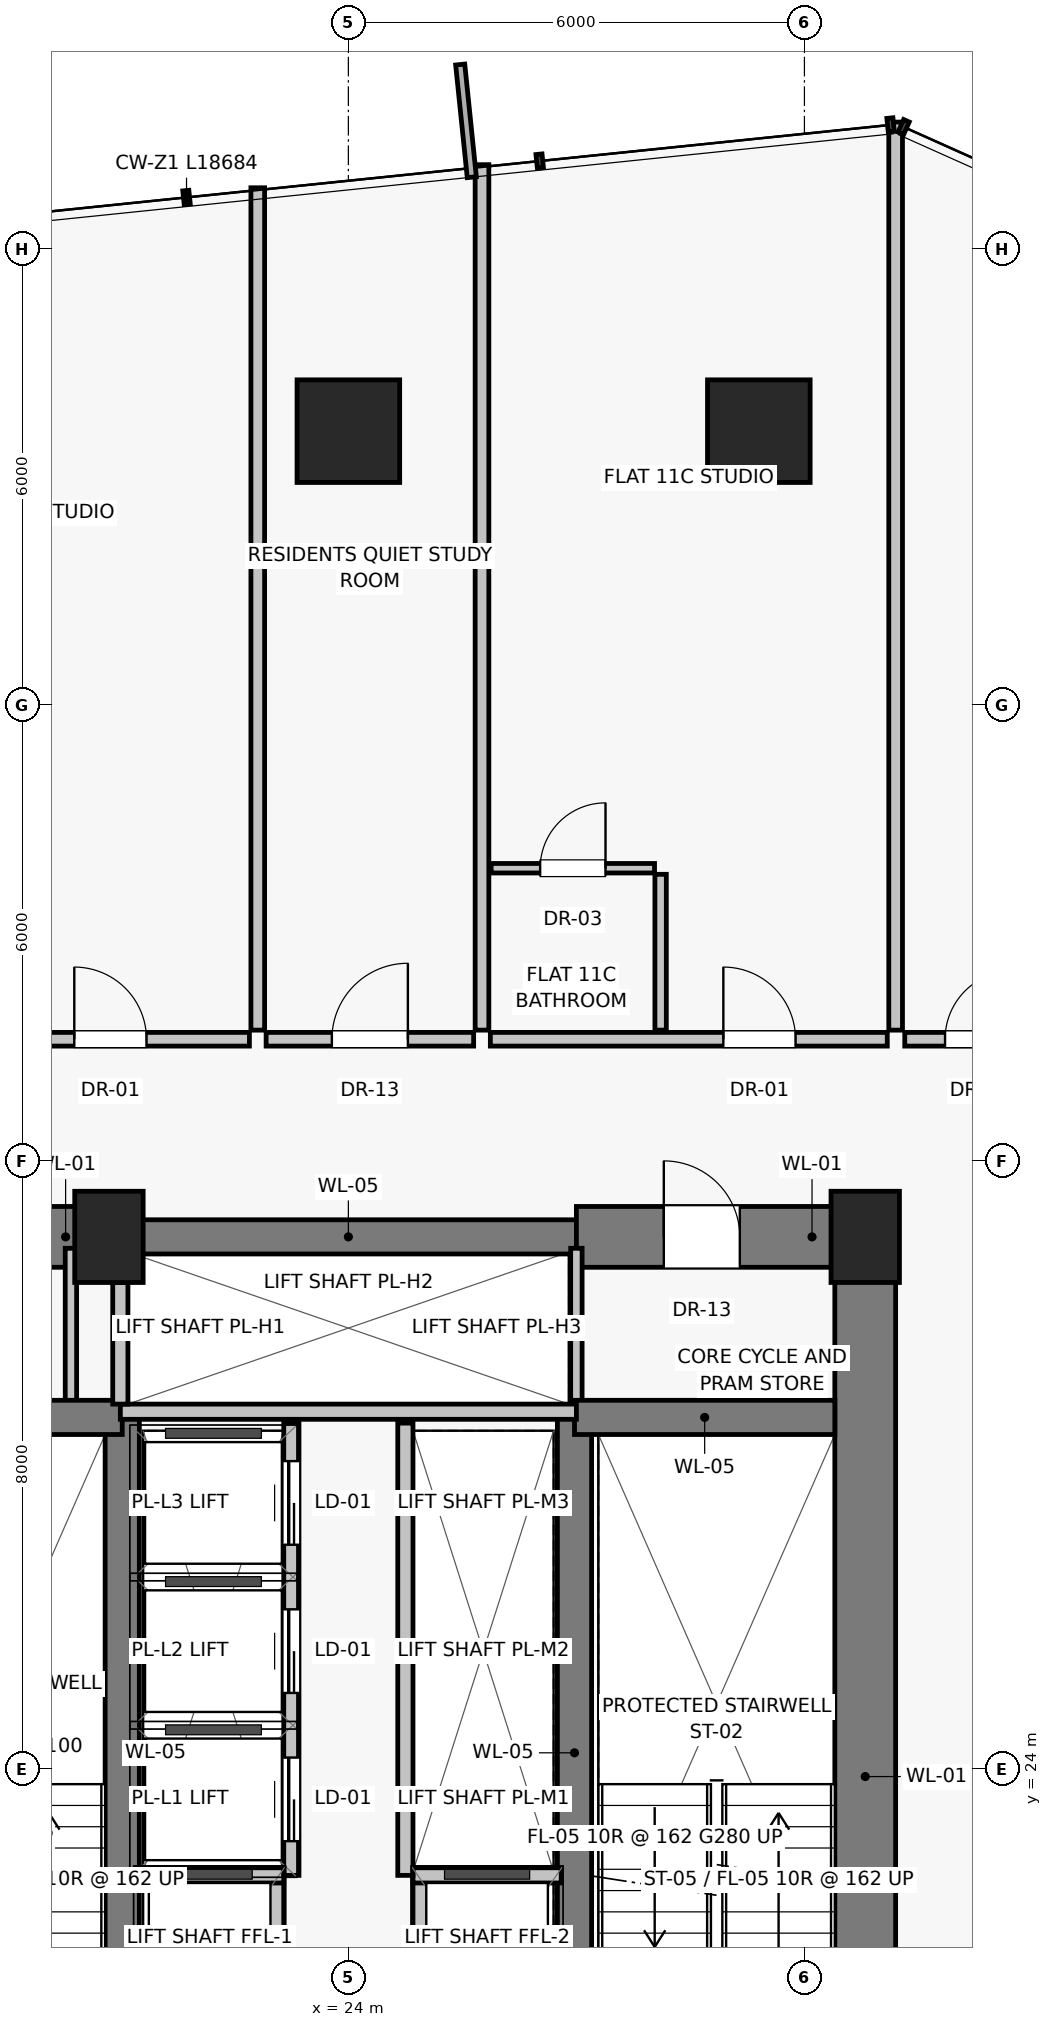
"""IFC4 building model, lengths in metres.
Left out: names, types, materials, properties, quantities, classifications, styles, units other than length and angle.
Written with IfcOpenShell. Run it as: python <this file> out.ifc"""

import sys

from ifc_helpers import new_model, si_unit, direction, frame, frame_2d, origin, origin_2d, place, context, subcontext, project, spatial, rectangle, extrude, source, transform, mapped, element, fill, save


model = new_model("IFC4")
c1 = context("Model", 3, precision=1e-05, world=origin(), true_north=direction((0.0, 1.0)))
c2 = subcontext(c1, "Body", "Model", "MODEL_VIEW")
j1 = project(units=[si_unit("LENGTHUNIT", "METRE"), si_unit("PLANEANGLEUNIT", "RADIAN")], contexts=[c1])
p1 = place(None, origin())
s1 = spatial("IfcSite", under=j1, at=p1, CompositionType="ELEMENT")
p2 = place(p1, origin())
s2 = spatial("IfcBuilding", under=s1, at=p2, CompositionType="ELEMENT")
p3 = place(p2, frame((0.0, 0.0, 43.55)))
s3 = spatial("IfcBuildingStorey", under=s2, at=p3, CompositionType="ELEMENT", Elevation=43.55)
for number, where, z_axis, x_axis in (
    (1, (20.85, 31.0, 0.0), (0.0, 0.0, 1.0), (1.0, 0.0, 0.0)),
    (2, (30.8, 31.0, 0.0), (0.0, 0.0, 1.0), (1.0, 0.0, 0.0)),
):
    element("IfcColumn", number, at=place(p3, frame(where, z_axis=z_axis, x_axis=x_axis)), inside=s3, PredefinedType="PILASTER", context=c2, shape_type="SweptSolid", body=[
        extrude(rectangle(XDim=0.9, YDim=1.2, at=origin_2d()), origin(), (0.0, 0.0, 1.0), 3.25),
    ])
for number, where, z_axis, x_axis in (
    (3, (29.4, 41.6, 0.0), (0.0, 0.0, 1.0), (1.0, 0.0, 0.0)),
    (4, (24.0, 41.6, 0.0), (0.0, 0.0, 1.0), (1.0, 0.0, 0.0)),
):
    element("IfcColumn", number, at=place(p3, frame(where, z_axis=z_axis, x_axis=x_axis)), inside=s3, PredefinedType="COLUMN", context=c2, shape_type="SweptSolid", body=[
        extrude(rectangle(XDim=1.35, YDim=1.35, at=origin_2d()), origin(), (0.0, 0.0, 1.0), 3.25),
    ])
p4 = place(p3, frame((30.8, 16.8, 0.0), z_axis=(0.0, 0.0, 1.0), x_axis=(0.0, 1.0, 0.0)))
e5 = element("IfcWall", 5, at=p4, inside=s3, PredefinedType="SHEAR", context=c2, shape_type="SweptSolid", body=[
    extrude(rectangle(XDim=14.2, YDim=0.8, at=frame_2d((7.1, 0.0))), origin(), (0.0, 0.0, 1.0), 3.0),
])
p5 = place(p3, frame((17.2, 31.0, 0.0), z_axis=(0.0, 0.0, 1.0), x_axis=(1.0, 0.0, 0.0)))
e6 = element("IfcWall", 6, at=p5, inside=s3, PredefinedType="SHEAR", context=c2, shape_type="SweptSolid", body=[
    extrude(rectangle(XDim=3.8, YDim=0.8, at=frame_2d((1.9, 0.0))), origin(), (0.0, 0.0, 1.0), 3.0),
])
p6 = place(p5, frame((1.25, 0.0, 0.0)))
e7 = element("IfcOpeningElement", 7, at=p6, cuts=e6, PredefinedType="OPENING", context=c2, shape_type="SweptSolid", body=[
    extrude(rectangle(XDim=0.86, YDim=2.01, at=frame_2d((0.43, 1.005))), frame((0.0, 0.41, 0.0), z_axis=(0.0, -1.0, 0.0), x_axis=(1.0, 0.0, 0.0)), (0.0, 0.0, 1.0), 0.82),
])
p7 = place(p3, frame((21.0, 31.0, 0.0), z_axis=(0.0, 0.0, 1.0), x_axis=(1.0, 0.0, 0.0)))
e8 = element("IfcWall", 8, at=p7, inside=s3, PredefinedType="SHEAR", context=c2, shape_type="SweptSolid", body=[
    extrude(rectangle(XDim=6.0, YDim=0.45, at=frame_2d((3.0, 0.0))), origin(), (0.0, 0.0, 1.0), 3.0),
])
p8 = place(p3, frame((27.0, 31.0, 0.0), z_axis=(0.0, 0.0, 1.0), x_axis=(1.0, 0.0, 0.0)))
e9 = element("IfcWall", 9, at=p8, inside=s3, PredefinedType="SHEAR", context=c2, shape_type="SweptSolid", body=[
    extrude(rectangle(XDim=3.8, YDim=0.8, at=frame_2d((1.9, 0.0))), origin(), (0.0, 0.0, 1.0), 3.0),
])
p9 = place(p8, frame((1.15, 0.0, 0.0)))
e10 = element("IfcOpeningElement", 10, at=p9, cuts=e9, PredefinedType="OPENING", context=c2, shape_type="SweptSolid", body=[
    extrude(rectangle(XDim=1.0, YDim=2.01, at=frame_2d((0.5, 1.005))), frame((0.0, 0.41, 0.0), z_axis=(0.0, -1.0, 0.0), x_axis=(1.0, 0.0, 0.0)), (0.0, 0.0, 1.0), 0.82),
])
for number, where, z_axis, x_axis in (
    (11, (20.35, 28.65, 0.0), (0.0, 0.0, 1.0), (0.0, 1.0, 0.0)),
    (12, (27.0, 28.65, 0.0), (0.0, 0.0, 1.0), (0.0, 1.0, 0.0)),
):
    element("IfcWall", number, at=place(p3, frame(where, z_axis=z_axis, x_axis=x_axis)), inside=s3, PredefinedType="PARTITIONING", context=c2, shape_type="SweptSolid", body=[
        extrude(rectangle(XDim=2.2, YDim=0.15, at=frame_2d((1.1, 0.0))), origin(), (0.0, 0.0, 1.0), 3.0),
    ])
for number, where, z_axis, x_axis in (
    (13, (21.025, 19.8, 0.0), (0.0, 0.0, 1.0), (0.0, 1.0, 0.0)),
    (14, (26.975, 19.8, 0.0), (0.0, 0.0, 1.0), (0.0, 1.0, 0.0)),
):
    element("IfcWall", number, at=place(p3, frame(where, z_axis=z_axis, x_axis=x_axis)), inside=s3, PredefinedType="SHEAR", context=c2, shape_type="SweptSolid", body=[
        extrude(rectangle(XDim=8.825, YDim=0.45, at=frame_2d((4.413, 0.0))), origin(), (0.0, 0.0, 1.0), 3.0),
    ])
for number, where, z_axis, x_axis in (
    (15, (17.6, 28.625, 0.0), (0.0, 0.0, 1.0), (1.0, 0.0, 0.0)),
    (16, (26.975, 28.625, 0.0), (0.0, 0.0, 1.0), (1.0, 0.0, 0.0)),
):
    element("IfcWall", number, at=place(p3, frame(where, z_axis=z_axis, x_axis=x_axis)), inside=s3, PredefinedType="SHEAR", context=c2, shape_type="SweptSolid", body=[
        extrude(rectangle(XDim=3.425, YDim=0.45, at=frame_2d((1.712, 0.0))), origin(), (0.0, 0.0, 1.0), 3.0),
    ])
for number, where, z_axis, x_axis in (
    (17, (23.05, 16.95, 0.0), (0.0, 0.0, 1.0), (0.0, 1.0, 0.0)),
    (18, (24.95, 16.95, 0.0), (0.0, 0.0, 1.0), (0.0, 1.0, 0.0)),
):
    element("IfcWall", number, at=place(p3, frame(where, z_axis=z_axis, x_axis=x_axis)), inside=s3, PredefinedType="SOLIDWALL", context=c2, shape_type="SweptSolid", body=[
        extrude(rectangle(XDim=5.6, YDim=0.2, at=frame_2d((2.8, 0.0))), origin(), (0.0, 0.0, 1.0), 3.0),
    ])
for number, where, z_axis, x_axis in (
    (19, (21.2, 22.6, 0.0), (0.0, 0.0, 1.0), (1.0, 0.0, 0.0)),
    (20, (24.85, 22.6, 0.0), (0.0, 0.0, 1.0), (1.0, 0.0, 0.0)),
):
    element("IfcWall", number, at=place(p3, frame(where, z_axis=z_axis, x_axis=x_axis)), inside=s3, PredefinedType="SOLIDWALL", context=c2, shape_type="SweptSolid", body=[
        extrude(rectangle(XDim=1.95, YDim=0.2, at=frame_2d((0.975, 0.0))), origin(), (0.0, 0.0, 1.0), 3.0),
    ])
p10 = place(p3, frame((21.0, 28.7, 0.0), z_axis=(0.0, 0.0, 1.0), x_axis=(1.0, 0.0, 0.0)))
e21 = element("IfcWall", 21, at=p10, inside=s3, PredefinedType="SOLIDWALL", context=c2, shape_type="SweptSolid", body=[
    extrude(rectangle(XDim=6.0, YDim=0.2, at=frame_2d((3.0, 0.0))), origin(), (0.0, 0.0, 1.0), 3.0),
])
p11 = place(p3, frame((21.0, 28.8, 0.0), z_axis=(0.0, 0.0, 1.0), x_axis=(0.0, 1.0, 0.0)))
e22 = element("IfcWall", 22, at=p11, inside=s3, PredefinedType="SOLIDWALL", context=c2, shape_type="SweptSolid", body=[
    extrude(rectangle(XDim=1.6, YDim=0.2, at=frame_2d((0.8, 0.0))), origin(), (0.0, 0.0, 1.0), 3.0),
])
p12 = place(p3, frame((23.25, 22.6, 0.0), z_axis=(0.0, 0.0, 1.0), x_axis=(0.0, 1.0, 0.0)))
e23 = element("IfcWall", 23, at=p12, inside=s3, PredefinedType="SOLIDWALL", context=c2, shape_type="SweptSolid", body=[
    extrude(rectangle(XDim=5.95, YDim=0.2, at=frame_2d((2.975, 0.0))), origin(), (0.0, 0.0, 1.0), 3.0),
])
p13 = place(p12, frame((0.45, 0.0, 0.0)))
e24 = element("IfcOpeningElement", 24, at=p13, cuts=e23, PredefinedType="OPENING", context=c2, shape_type="SweptSolid", body=[
    extrude(rectangle(XDim=1.1, YDim=2.08, at=frame_2d((0.55, 1.04))), frame((0.0, 0.11, 0.0), z_axis=(0.0, -1.0, 0.0), x_axis=(1.0, 0.0, 0.0)), (0.0, 0.0, 1.0), 0.22),
])
p14 = place(p12, frame((2.4, 0.0, 0.0)))
e25 = element("IfcOpeningElement", 25, at=p14, cuts=e23, PredefinedType="OPENING", context=c2, shape_type="SweptSolid", body=[
    extrude(rectangle(XDim=1.1, YDim=2.08, at=frame_2d((0.55, 1.04))), frame((0.0, 0.11, 0.0), z_axis=(0.0, -1.0, 0.0), x_axis=(1.0, 0.0, 0.0)), (0.0, 0.0, 1.0), 0.22),
])
p15 = place(p12, frame((4.35, 0.0, 0.0)))
e26 = element("IfcOpeningElement", 26, at=p15, cuts=e23, PredefinedType="OPENING", context=c2, shape_type="SweptSolid", body=[
    extrude(rectangle(XDim=1.1, YDim=2.08, at=frame_2d((0.55, 1.04))), frame((0.0, 0.11, 0.0), z_axis=(0.0, -1.0, 0.0), x_axis=(1.0, 0.0, 0.0)), (0.0, 0.0, 1.0), 0.22),
])
p16 = place(p3, frame((24.75, 22.6, 0.0), z_axis=(0.0, 0.0, 1.0), x_axis=(0.0, 1.0, 0.0)))
e27 = element("IfcWall", 27, at=p16, inside=s3, PredefinedType="SOLIDWALL", context=c2, shape_type="SweptSolid", body=[
    extrude(rectangle(XDim=5.95, YDim=0.2, at=frame_2d((2.975, 0.0))), origin(), (0.0, 0.0, 1.0), 3.0),
])
p17 = place(p3, frame((31.2, 33.72, 0.0), z_axis=(0.0, 0.0, 1.0), x_axis=(0.0, 1.0, 0.0)))
e28 = element("IfcWall", 28, at=p17, inside=s3, PredefinedType="PARTITIONING", context=c2, shape_type="SweptSolid", body=[
    extrude(rectangle(XDim=11.946, YDim=0.18, at=frame_2d((5.973, 0.0))), origin(), (0.0, 0.0, 1.0), 3.0),
])
p18 = place(p3, frame((22.918, 33.6, 0.0), z_axis=(0.0, 0.0, 1.0), x_axis=(1.0, 0.0, 0.0)))
e29 = element("IfcWall", 29, at=p18, inside=s3, PredefinedType="PARTITIONING", context=c2, shape_type="SweptSolid", body=[
    extrude(rectangle(XDim=2.73, YDim=0.18, at=frame_2d((1.365, 0.0))), origin(), (0.0, 0.0, 1.0), 3.0),
])
p19 = place(p18, frame((0.865, 0.0, 0.0)))
e30 = element("IfcOpeningElement", 30, at=p19, cuts=e29, PredefinedType="OPENING", context=c2, shape_type="SweptSolid", body=[
    extrude(rectangle(XDim=1.0, YDim=2.01, at=frame_2d((0.5, 1.005))), frame((0.0, 0.1, 0.0), z_axis=(0.0, -1.0, 0.0), x_axis=(1.0, 0.0, 0.0)), (0.0, 0.0, 1.0), 0.2),
])
p20 = place(p3, frame((22.808, 33.72, 0.0), z_axis=(0.0, 0.0, 1.0), x_axis=(0.0, 1.0, 0.0)))
e31 = element("IfcWall", 31, at=p20, inside=s3, PredefinedType="PARTITIONING", context=c2, shape_type="SweptSolid", body=[
    extrude(rectangle(XDim=11.082, YDim=0.18, at=frame_2d((5.541, 0.0))), origin(), (0.0, 0.0, 1.0), 3.0),
])
p21 = place(p3, frame((16.91, 33.6, 0.0), z_axis=(0.0, 0.0, 1.0), x_axis=(1.0, 0.0, 0.0)))
e32 = element("IfcWall", 32, at=p21, inside=s3, PredefinedType="PARTITIONING", context=c2, shape_type="SweptSolid", body=[
    extrude(rectangle(XDim=5.788, YDim=0.18, at=frame_2d((2.894, 0.0))), origin(), (0.0, 0.0, 1.0), 3.0),
])
p22 = place(p21, frame((3.484, 0.0, 0.0)))
e33 = element("IfcOpeningElement", 33, at=p22, cuts=e32, PredefinedType="OPENING", context=c2, shape_type="SweptSolid", body=[
    extrude(rectangle(XDim=0.95, YDim=2.02, at=frame_2d((0.475, 1.01))), frame((0.0, 0.1, 0.0), z_axis=(0.0, -1.0, 0.0), x_axis=(1.0, 0.0, 0.0)), (0.0, 0.0, 1.0), 0.2),
])
p23 = place(p3, frame((25.758, 33.72, 0.0), z_axis=(0.0, 0.0, 1.0), x_axis=(0.0, 1.0, 0.0)))
e34 = element("IfcWall", 34, at=p23, inside=s3, PredefinedType="PARTITIONING", context=c2, shape_type="SweptSolid", body=[
    extrude(rectangle(XDim=11.386, YDim=0.18, at=frame_2d((5.693, 0.0))), origin(), (0.0, 0.0, 1.0), 3.0),
])
p24 = place(p3, frame((25.868, 33.6, 0.0), z_axis=(0.0, 0.0, 1.0), x_axis=(1.0, 0.0, 0.0)))
e35 = element("IfcWall", 35, at=p24, inside=s3, PredefinedType="PARTITIONING", context=c2, shape_type="SweptSolid", body=[
    extrude(rectangle(XDim=5.222, YDim=0.18, at=frame_2d((2.611, 0.0))), origin(), (0.0, 0.0, 1.0), 3.0),
])
p25 = place(p24, frame((3.065, 0.0, 0.0)))
e36 = element("IfcOpeningElement", 36, at=p25, cuts=e35, PredefinedType="OPENING", context=c2, shape_type="SweptSolid", body=[
    extrude(rectangle(XDim=0.95, YDim=2.02, at=frame_2d((0.475, 1.01))), frame((0.0, 0.1, 0.0), z_axis=(0.0, -1.0, 0.0), x_axis=(1.0, 0.0, 0.0)), (0.0, 0.0, 1.0), 0.2),
])
p26 = place(p3, frame((28.108, 33.72, 0.0), z_axis=(0.0, 0.0, 1.0), x_axis=(0.0, 1.0, 0.0)))
e37 = element("IfcWall", 37, at=p26, inside=s3, PredefinedType="PARTITIONING", context=c2, shape_type="SweptSolid", body=[
    extrude(rectangle(XDim=2.05, YDim=0.15, at=frame_2d((1.025, 0.0))), origin(), (0.0, 0.0, 1.0), 3.0),
])
p27 = place(p3, frame((25.878, 35.85, 0.0), z_axis=(0.0, 0.0, 1.0), x_axis=(1.0, 0.0, 0.0)))
e38 = element("IfcWall", 38, at=p27, inside=s3, PredefinedType="PARTITIONING", context=c2, shape_type="SweptSolid", body=[
    extrude(rectangle(XDim=2.15, YDim=0.125, at=frame_2d((1.075, 0.0))), origin(), (0.0, 0.0, 1.0), 3.0),
])
p28 = place(p27, frame((0.645, 0.0, 0.0)))
e39 = element("IfcOpeningElement", 39, at=p28, cuts=e38, PredefinedType="OPENING", context=c2, shape_type="SweptSolid", body=[
    extrude(rectangle(XDim=0.86, YDim=2.01, at=frame_2d((0.43, 1.005))), frame((0.0, 0.073, 0.0), z_axis=(0.0, -1.0, 0.0), x_axis=(1.0, 0.0, 0.0)), (0.0, 0.0, 1.0), 0.145),
])
p29 = place(p3, frame((31.32, 33.6, 0.0), z_axis=(0.0, 0.0, 1.0), x_axis=(1.0, 0.0, 0.0)))
e40 = element("IfcWall", 40, at=p29, inside=s3, PredefinedType="PARTITIONING", context=c2, shape_type="SweptSolid", body=[
    extrude(rectangle(XDim=1.96, YDim=0.18, at=frame_2d((0.98, 0.0))), origin(), (0.0, 0.0, 1.0), 3.0),
])
p30 = place(p29, frame((0.53, 0.0, 0.0)))
e41 = element("IfcOpeningElement", 41, at=p30, cuts=e40, PredefinedType="OPENING", context=c2, shape_type="SweptSolid", body=[
    extrude(rectangle(XDim=0.9, YDim=2.01, at=frame_2d((0.45, 1.005))), frame((0.0, 0.1, 0.0), z_axis=(0.0, -1.0, 0.0), x_axis=(1.0, 0.0, 0.0)), (0.0, 0.0, 1.0), 0.2),
])
m1 = source(origin(), c2, "Body", "SweptSolid", [
    extrude(rectangle(XDim=1.0, YDim=2.01, at=frame_2d((0.5, 1.005))), frame((0.0, 0.025, 0.0), z_axis=(0.0, -1.0, 0.0), x_axis=(1.0, 0.0, 0.0)), (0.0, 0.0, 1.0), 0.05),
])
p31 = place(p9, origin())
e42 = element("IfcDoor", 42, at=p31, inside=s3, OperationType="SINGLE_SWING_LEFT", PredefinedType="DOOR", context=c2, shape_type="MappedRepresentation", body=[
    mapped(m1, transform((0.0, 0.0, 0.0), scale=1.0)),
])
fill(e10, e42)
m2 = source(origin(), c2, "Body", "SweptSolid", [
    extrude(rectangle(XDim=1.1, YDim=2.08, at=frame_2d((0.55, 1.04))), frame((0.0, 0.025, 0.0), z_axis=(0.0, -1.0, 0.0), x_axis=(1.0, 0.0, 0.0)), (0.0, 0.0, 1.0), 0.05),
])
p32 = place(p13, origin())
e43 = element("IfcDoor", 43, at=p32, inside=s3, OperationType="SLIDING_TO_LEFT", PredefinedType="DOOR", context=c2, shape_type="MappedRepresentation", body=[
    mapped(m2, transform((0.0, 0.0, 0.0), scale=1.0)),
])
fill(e24, e43)
p33 = place(p14, origin())
e44 = element("IfcDoor", 44, at=p33, inside=s3, OperationType="SLIDING_TO_LEFT", PredefinedType="DOOR", context=c2, shape_type="MappedRepresentation", body=[
    mapped(m2, transform((0.0, 0.0, 0.0), scale=1.0)),
])
fill(e25, e44)
p34 = place(p15, origin())
e45 = element("IfcDoor", 45, at=p34, inside=s3, OperationType="SLIDING_TO_LEFT", PredefinedType="DOOR", context=c2, shape_type="MappedRepresentation", body=[
    mapped(m2, transform((0.0, 0.0, 0.0), scale=1.0)),
])
fill(e26, e45)
p35 = place(p19, origin())
e46 = element("IfcDoor", 46, at=p35, inside=s3, OperationType="SINGLE_SWING_RIGHT", PredefinedType="DOOR", context=c2, shape_type="MappedRepresentation", body=[
    mapped(m1, transform((0.0, 0.0, 0.0), scale=1.0)),
])
fill(e30, e46)
m3 = source(origin(), c2, "Body", "SweptSolid", [
    extrude(rectangle(XDim=0.95, YDim=2.02, at=frame_2d((0.475, 1.01))), frame((0.0, 0.025, 0.0), z_axis=(0.0, -1.0, 0.0), x_axis=(1.0, 0.0, 0.0)), (0.0, 0.0, 1.0), 0.05),
])
p36 = place(p22, origin())
e47 = element("IfcDoor", 47, at=p36, inside=s3, OperationType="SINGLE_SWING_LEFT", PredefinedType="DOOR", context=c2, shape_type="MappedRepresentation", body=[
    mapped(m3, transform((0.0, 0.0, 0.0), scale=1.0)),
])
fill(e33, e47)
p37 = place(p25, origin())
e48 = element("IfcDoor", 48, at=p37, inside=s3, OperationType="SINGLE_SWING_LEFT", PredefinedType="DOOR", context=c2, shape_type="MappedRepresentation", body=[
    mapped(m3, transform((0.0, 0.0, 0.0), scale=1.0)),
])
fill(e36, e48)
m4 = source(origin(), c2, "Body", "SweptSolid", [
    extrude(rectangle(XDim=0.86, YDim=2.01, at=frame_2d((0.43, 1.005))), frame((0.0, 0.025, 0.0), z_axis=(0.0, -1.0, 0.0), x_axis=(1.0, 0.0, 0.0)), (0.0, 0.0, 1.0), 0.05),
])
p38 = place(p28, origin())
e49 = element("IfcDoor", 49, at=p38, inside=s3, OperationType="SINGLE_SWING_RIGHT", PredefinedType="DOOR", context=c2, shape_type="MappedRepresentation", body=[
    mapped(m4, transform((0.0, 0.0, 0.0), scale=1.0)),
])
fill(e39, e49)
m5 = source(origin(), c2, "Body", "SweptSolid", [
    extrude(rectangle(XDim=0.9, YDim=2.01, at=frame_2d((0.45, 1.005))), frame((0.0, 0.025, 0.0), z_axis=(0.0, -1.0, 0.0), x_axis=(1.0, 0.0, 0.0)), (0.0, 0.0, 1.0), 0.05),
])
p39 = place(p30, origin())
e50 = element("IfcDoor", 50, at=p39, inside=s3, OperationType="SINGLE_SWING_RIGHT", PredefinedType="DOOR", context=c2, shape_type="MappedRepresentation", body=[
    mapped(m5, transform((0.0, 0.0, 0.0), scale=1.0)),
])
fill(e41, e50)
save(model, sys.argv[1])
